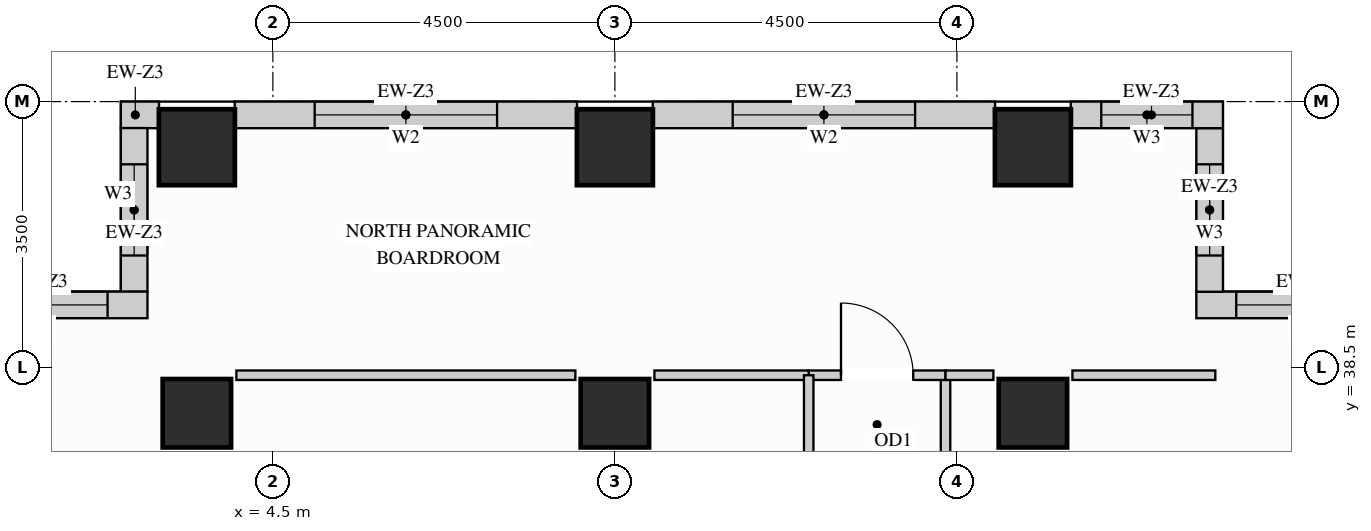
"""IFC4 building model, lengths in metres.
Left out: names, types, materials, properties, quantities, classifications, styles, units other than length and angle.
Written with IfcOpenShell. Run it as: python <this file> out.ifc"""

import sys

from ifc_helpers import new_model, si_unit, direction, frame, frame_2d, origin, origin_2d, place, context, subcontext, project, spatial, rectangle, extrude, source, transform, mapped, element, fill, save


model = new_model("IFC4")
c1 = context("Model", 3, precision=1e-05, world=origin(), true_north=direction((0.0, 1.0)))
c2 = subcontext(c1, "Body", "Model", "MODEL_VIEW")
j1 = project(units=[si_unit("LENGTHUNIT", "METRE"), si_unit("PLANEANGLEUNIT", "RADIAN")], contexts=[c1])
p1 = place(None, origin())
s1 = spatial("IfcSite", under=j1, at=p1, CompositionType="ELEMENT")
p2 = place(p1, origin())
s2 = spatial("IfcBuilding", under=s1, at=p2, CompositionType="ELEMENT")
p3 = place(p2, frame((0.0, 0.0, 197.1)))
s3 = spatial("IfcBuildingStorey", under=s2, at=p3, CompositionType="ELEMENT", Elevation=197.1)
m1 = source(origin(), c2, "Body", "SweptSolid", [
    extrude(rectangle(XDim=0.9, YDim=0.9, at=origin_2d()), origin(), (0.0, 0.0, 1.0), 3.4),
])
for number, where, z_axis, x_axis in (
    (1, (14.5, 37.9, 0.0), (0.0, 0.0, 1.0), (1.0, 0.0, 0.0)),
    (2, (3.5, 37.9, 0.0), (0.0, 0.0, 1.0), (1.0, 0.0, 0.0)),
    (3, (9.0, 37.9, 0.0), (0.0, 0.0, 1.0), (1.0, 0.0, 0.0)),
):
    element("IfcColumn", number, at=place(p3, frame(where, z_axis=z_axis, x_axis=x_axis)), inside=s3, PredefinedType="COLUMN", context=c2, shape_type="MappedRepresentation", body=[
        mapped(m1, transform((0.0, 0.0, 0.0), x_axis=(1.0, 0.0, 0.0), y_axis=(0.0, 1.0, 0.0), z_axis=(0.0, 0.0, 1.0))),
    ])
m2 = source(origin(), c2, "Body", "SweptSolid", [
    extrude(rectangle(XDim=1.0, YDim=1.0, at=origin_2d()), origin(), (0.0, 0.0, 1.0), 3.4),
])
for number, where, z_axis, x_axis in (
    (4, (14.5, 41.4, 0.0), (0.0, 0.0, 1.0), (1.0, 0.0, 0.0)),
    (5, (3.5, 41.4, 0.0), (0.0, 0.0, 1.0), (1.0, 0.0, 0.0)),
    (6, (9.0, 41.4, 0.0), (0.0, 0.0, 1.0), (1.0, 0.0, 0.0)),
):
    element("IfcColumn", number, at=place(p3, frame(where, z_axis=z_axis, x_axis=x_axis)), inside=s3, PredefinedType="COLUMN", context=c2, shape_type="MappedRepresentation", body=[
        mapped(m2, transform((0.0, 0.0, 0.0), x_axis=(1.0, 0.0, 0.0), y_axis=(0.0, 1.0, 0.0), z_axis=(0.0, 0.0, 1.0))),
    ])
p4 = place(p3, frame((19.5, 39.325, 0.0), z_axis=(0.0, 0.0, 1.0), x_axis=(-1.0, 0.0, 0.0)))
e7 = element("IfcWall", 7, at=p4, inside=s3, PredefinedType="SOLIDWALL", context=c2, shape_type="SweptSolid", body=[
    extrude(rectangle(XDim=2.85, YDim=0.35, at=frame_2d((1.425, 0.0))), origin(), (0.0, 0.0, 1.0), 3.385),
])
p5 = place(p4, frame((0.525, 0.0, 0.78)))
e8 = element("IfcOpeningElement", 8, at=p5, cuts=e7, PredefinedType="OPENING", context=c2, shape_type="SweptSolid", body=[
    extrude(rectangle(XDim=1.8, YDim=2.1, at=frame_2d((0.9, 1.05))), frame((0.0, 0.185, 0.0), z_axis=(0.0, -1.0, 0.0), x_axis=(1.0, 0.0, 0.0)), (0.0, 0.0, 1.0), 0.37),
])
p6 = place(p3, frame((16.825, 39.498, 0.0), z_axis=(0.0, 0.0, 1.0), x_axis=(0.0, 1.0, 0.0)))
e9 = element("IfcWall", 9, at=p6, inside=s3, PredefinedType="SOLIDWALL", context=c2, shape_type="SweptSolid", body=[
    extrude(rectangle(XDim=2.154, YDim=0.35, at=frame_2d((1.077, 0.0))), origin(), (0.0, 0.0, 1.0), 3.385),
])
p7 = place(p6, frame((0.477, 0.0, 0.78)))
e10 = element("IfcOpeningElement", 10, at=p7, cuts=e9, PredefinedType="OPENING", context=c2, shape_type="SweptSolid", body=[
    extrude(rectangle(XDim=1.2, YDim=2.1, at=frame_2d((0.6, 1.05))), frame((0.0, 0.185, 0.0), z_axis=(0.0, -1.0, 0.0), x_axis=(1.0, 0.0, 0.0)), (0.0, 0.0, 1.0), 0.37),
])
p8 = place(p3, frame((17.0, 41.825, 0.0), z_axis=(0.0, 0.0, 1.0), x_axis=(-1.0, 0.0, 0.0)))
e11 = element("IfcWall", 11, at=p8, inside=s3, PredefinedType="SOLIDWALL", context=c2, shape_type="SweptSolid", body=[
    extrude(rectangle(XDim=2.002, YDim=0.35, at=frame_2d((1.001, 0.0))), origin(), (0.0, 0.0, 1.0), 3.385),
])
p9 = place(p8, frame((0.401, 0.0, 0.78)))
e12 = element("IfcOpeningElement", 12, at=p9, cuts=e11, PredefinedType="OPENING", context=c2, shape_type="SweptSolid", body=[
    extrude(rectangle(XDim=1.2, YDim=2.1, at=frame_2d((0.6, 1.05))), frame((0.0, 0.185, 0.0), z_axis=(0.0, -1.0, 0.0), x_axis=(1.0, 0.0, 0.0)), (0.0, 0.0, 1.0), 0.37),
])
p10 = place(p3, frame((14.002, 41.825, 0.0), z_axis=(0.0, 0.0, 1.0), x_axis=(-1.0, 0.0, 0.0)))
e13 = element("IfcWall", 13, at=p10, inside=s3, PredefinedType="SOLIDWALL", context=c2, shape_type="SweptSolid", body=[
    extrude(rectangle(XDim=4.504, YDim=0.35, at=frame_2d((2.252, 0.0))), origin(), (0.0, 0.0, 1.0), 2.612),
])
p11 = place(p10, frame((1.052, 0.0, 0.78)))
e14 = element("IfcOpeningElement", 14, at=p11, cuts=e13, PredefinedType="OPENING", context=c2, shape_type="SweptSolid", body=[
    extrude(rectangle(XDim=2.4, YDim=1.652, at=frame_2d((1.2, 0.826))), frame((0.0, 0.185, 0.0), z_axis=(0.0, -1.0, 0.0), x_axis=(1.0, 0.0, 0.0)), (0.0, 0.0, 1.0), 0.37),
])
p12 = place(p3, frame((8.502, 41.825, 0.0), z_axis=(0.0, 0.0, 1.0), x_axis=(-1.0, 0.0, 0.0)))
e15 = element("IfcWall", 15, at=p12, inside=s3, PredefinedType="SOLIDWALL", context=c2, shape_type="SweptSolid", body=[
    extrude(rectangle(XDim=4.504, YDim=0.35, at=frame_2d((2.252, 0.0))), origin(), (0.0, 0.0, 1.0), 2.612),
])
p13 = place(p12, frame((1.052, 0.0, 0.78)))
e16 = element("IfcOpeningElement", 16, at=p13, cuts=e15, PredefinedType="OPENING", context=c2, shape_type="SweptSolid", body=[
    extrude(rectangle(XDim=2.4, YDim=1.652, at=frame_2d((1.2, 0.826))), frame((0.0, 0.185, 0.0), z_axis=(0.0, -1.0, 0.0), x_axis=(1.0, 0.0, 0.0)), (0.0, 0.0, 1.0), 0.37),
])
m3 = source(origin(), c2, "Body", "SweptSolid", [
    extrude(rectangle(XDim=0.502, YDim=0.35, at=frame_2d((0.251, 0.0))), origin(), (0.0, 0.0, 1.0), 3.385),
])
p14 = place(p3, frame((3.002, 41.825, 0.0), z_axis=(0.0, 0.0, 1.0), x_axis=(-1.0, 0.0, 0.0)))
e17 = element("IfcWall", 17, at=p14, inside=s3, PredefinedType="SOLIDWALL", context=c2, shape_type="MappedRepresentation", body=[
    mapped(m3, transform((0.0, 0.0, 0.0), x_axis=(1.0, 0.0, 0.0), y_axis=(0.0, 1.0, 0.0), z_axis=(0.0, 0.0, 1.0))),
])
p15 = place(p3, frame((2.675, 41.652, 0.0), z_axis=(0.0, 0.0, 1.0), x_axis=(0.0, -1.0, 0.0)))
e18 = element("IfcWall", 18, at=p15, inside=s3, PredefinedType="SOLIDWALL", context=c2, shape_type="SweptSolid", body=[
    extrude(rectangle(XDim=2.154, YDim=0.35, at=frame_2d((1.077, 0.0))), origin(), (0.0, 0.0, 1.0), 3.385),
])
p16 = place(p15, frame((0.477, 0.0, 0.78)))
e19 = element("IfcOpeningElement", 19, at=p16, cuts=e18, PredefinedType="OPENING", context=c2, shape_type="SweptSolid", body=[
    extrude(rectangle(XDim=1.2, YDim=2.1, at=frame_2d((0.6, 1.05))), frame((0.0, 0.185, 0.0), z_axis=(0.0, -1.0, 0.0), x_axis=(1.0, 0.0, 0.0)), (0.0, 0.0, 1.0), 0.37),
])
p17 = place(p3, frame((2.85, 39.325, 0.0), z_axis=(0.0, 0.0, 1.0), x_axis=(-1.0, 0.0, 0.0)))
e20 = element("IfcWall", 20, at=p17, inside=s3, PredefinedType="SOLIDWALL", context=c2, shape_type="SweptSolid", body=[
    extrude(rectangle(XDim=2.85, YDim=0.35, at=frame_2d((1.425, 0.0))), origin(), (0.0, 0.0, 1.0), 3.385),
])
p18 = place(p17, frame((0.525, 0.0, 0.78)))
e21 = element("IfcOpeningElement", 21, at=p18, cuts=e20, PredefinedType="OPENING", context=c2, shape_type="SweptSolid", body=[
    extrude(rectangle(XDim=1.8, YDim=2.1, at=frame_2d((0.9, 1.05))), frame((0.0, 0.185, 0.0), z_axis=(0.0, -1.0, 0.0), x_axis=(1.0, 0.0, 0.0)), (0.0, 0.0, 1.0), 0.37),
])
p19 = place(p3, frame((13.35, 32.35, 0.0), z_axis=(0.0, 0.0, 1.0), x_axis=(0.0, 1.0, 0.0)))
e22 = element("IfcWall", 22, at=p19, inside=s3, PredefinedType="PARTITIONING", context=c2, shape_type="SweptSolid", body=[
    extrude(rectangle(XDim=6.05, YDim=0.125, at=frame_2d((3.025, 0.0))), origin(), (0.0, 0.0, 1.0), 3.385),
])
p20 = place(p19, frame((2.55, 0.0, 0.0)))
e23 = element("IfcOpeningElement", 23, at=p20, cuts=e22, PredefinedType="OPENING", context=c2, shape_type="SweptSolid", body=[
    extrude(rectangle(XDim=0.95, YDim=2.15, at=frame_2d((0.475, 1.075))), frame((0.0, 0.073, 0.0), z_axis=(0.0, -1.0, 0.0), x_axis=(1.0, 0.0, 0.0)), (0.0, 0.0, 1.0), 0.145),
])
p21 = place(p3, frame((11.55, 38.4, 0.0), z_axis=(0.0, 0.0, 1.0), x_axis=(1.0, 0.0, 0.0)))
e24 = element("IfcWall", 24, at=p21, inside=s3, PredefinedType="PARTITIONING", context=c2, shape_type="SweptSolid", body=[
    extrude(rectangle(XDim=1.8, YDim=0.125, at=frame_2d((0.9, 0.0))), origin(), (0.0, 0.0, 1.0), 3.385),
])
p22 = place(p21, frame((0.425, 0.0, 0.0)))
e25 = element("IfcOpeningElement", 25, at=p22, cuts=e24, PredefinedType="OPENING", context=c2, shape_type="SweptSolid", body=[
    extrude(rectangle(XDim=0.95, YDim=2.15, at=frame_2d((0.475, 1.075))), frame((0.0, 0.073, 0.0), z_axis=(0.0, -1.0, 0.0), x_axis=(1.0, 0.0, 0.0)), (0.0, 0.0, 1.0), 0.145),
])
m4 = source(origin(), c2, "Body", "SweptSolid", [
    extrude(rectangle(XDim=0.63, YDim=0.125, at=frame_2d((0.315, 0.0))), origin(), (0.0, 0.0, 1.0), 3.385),
])
p23 = place(p3, frame((13.35, 38.4, 0.0), z_axis=(0.0, 0.0, 1.0), x_axis=(1.0, 0.0, 0.0)))
e26 = element("IfcWall", 26, at=p23, inside=s3, PredefinedType="PARTITIONING", context=c2, shape_type="MappedRepresentation", body=[
    mapped(m4, transform((0.0, 0.0, 0.0), x_axis=(1.0, 0.0, 0.0), y_axis=(0.0, 1.0, 0.0), z_axis=(0.0, 0.0, 1.0))),
])
m5 = source(origin(), c2, "Body", "SweptSolid", [
    extrude(rectangle(XDim=1.88, YDim=0.125, at=frame_2d((0.94, 0.0))), origin(), (0.0, 0.0, 1.0), 3.385),
])
p24 = place(p3, frame((15.02, 38.4, 0.0), z_axis=(0.0, 0.0, 1.0), x_axis=(1.0, 0.0, 0.0)))
e27 = element("IfcWall", 27, at=p24, inside=s3, PredefinedType="PARTITIONING", context=c2, shape_type="MappedRepresentation", body=[
    mapped(m5, transform((0.0, 0.0, 0.0), x_axis=(1.0, 0.0, 0.0), y_axis=(0.0, 1.0, 0.0), z_axis=(0.0, 0.0, 1.0))),
])
m6 = source(origin(), c2, "Body", "SweptSolid", [
    extrude(rectangle(XDim=4.46, YDim=0.125, at=frame_2d((2.23, 0.0))), origin(), (0.0, 0.0, 1.0), 3.385),
])
p25 = place(p3, frame((4.02, 38.4, 0.0), z_axis=(0.0, 0.0, 1.0), x_axis=(1.0, 0.0, 0.0)))
e28 = element("IfcWall", 28, at=p25, inside=s3, PredefinedType="PARTITIONING", context=c2, shape_type="MappedRepresentation", body=[
    mapped(m6, transform((0.0, 0.0, 0.0), x_axis=(1.0, 0.0, 0.0), y_axis=(0.0, 1.0, 0.0), z_axis=(0.0, 0.0, 1.0))),
])
m7 = source(origin(), c2, "Body", "SweptSolid", [
    extrude(rectangle(XDim=2.03, YDim=0.125, at=frame_2d((1.015, 0.0))), origin(), (0.0, 0.0, 1.0), 3.385),
])
p26 = place(p3, frame((9.52, 38.4, 0.0), z_axis=(0.0, 0.0, 1.0), x_axis=(1.0, 0.0, 0.0)))
e29 = element("IfcWall", 29, at=p26, inside=s3, PredefinedType="PARTITIONING", context=c2, shape_type="MappedRepresentation", body=[
    mapped(m7, transform((0.0, 0.0, 0.0), x_axis=(1.0, 0.0, 0.0), y_axis=(0.0, 1.0, 0.0), z_axis=(0.0, 0.0, 1.0))),
])
p27 = place(p3, frame((11.55, 35.254, 0.0), z_axis=(0.0, 0.0, 1.0), x_axis=(0.0, 1.0, 0.0)))
e30 = element("IfcWall", 30, at=p27, inside=s3, PredefinedType="PARTITIONING", context=c2, shape_type="SweptSolid", body=[
    extrude(rectangle(XDim=3.146, YDim=0.125, at=frame_2d((1.573, 0.0))), origin(), (0.0, 0.0, 1.0), 3.385),
])
p28 = place(p27, frame((1.098, 0.0, 0.0)))
e31 = element("IfcOpeningElement", 31, at=p28, cuts=e30, PredefinedType="OPENING", context=c2, shape_type="SweptSolid", body=[
    extrude(rectangle(XDim=0.95, YDim=2.15, at=frame_2d((0.475, 1.075))), frame((0.0, 0.073, 0.0), z_axis=(0.0, -1.0, 0.0), x_axis=(1.0, 0.0, 0.0)), (0.0, 0.0, 1.0), 0.145),
])
m8 = source(origin(), c2, "Body", "SweptSolid", [
    extrude(rectangle(XDim=0.95, YDim=2.15, at=frame_2d((0.475, 1.075))), frame((0.0, 0.025, 0.0), z_axis=(0.0, -1.0, 0.0), x_axis=(1.0, 0.0, 0.0)), (0.0, 0.0, 1.0), 0.05),
])
p29 = place(p22, origin())
e32 = element("IfcDoor", 32, at=p29, inside=s3, OperationType="SINGLE_SWING_LEFT", PredefinedType="DOOR", context=c2, shape_type="MappedRepresentation", body=[
    mapped(m8, transform((0.0, 0.0, 0.0), x_axis=(1.0, 0.0, 0.0), y_axis=(0.0, 1.0, 0.0), z_axis=(0.0, 0.0, 1.0))),
])
fill(e25, e32)
m9 = source(origin(), c2, "Body", "SweptSolid", [
    extrude(rectangle(XDim=1.8, YDim=2.1, at=frame_2d((0.9, 1.05))), frame((0.0, 0.03, 0.0), z_axis=(0.0, -1.0, 0.0), x_axis=(1.0, 0.0, 0.0)), (0.0, 0.0, 1.0), 0.06),
])
p30 = place(p5, origin())
e33 = element("IfcWindow", 33, at=p30, inside=s3, PartitioningType="SINGLE_PANEL", PredefinedType="WINDOW", context=c2, shape_type="MappedRepresentation", body=[
    mapped(m9, transform((0.0, 0.0, 0.0), x_axis=(1.0, 0.0, 0.0), y_axis=(0.0, 1.0, 0.0), z_axis=(0.0, 0.0, 1.0))),
])
fill(e8, e33)
p31 = place(p18, origin())
e34 = element("IfcWindow", 34, at=p31, inside=s3, PartitioningType="SINGLE_PANEL", PredefinedType="WINDOW", context=c2, shape_type="MappedRepresentation", body=[
    mapped(m9, transform((0.0, 0.0, 0.0), x_axis=(1.0, 0.0, 0.0), y_axis=(0.0, 1.0, 0.0), z_axis=(0.0, 0.0, 1.0))),
])
fill(e21, e34)
m10 = source(origin(), c2, "Body", "SweptSolid", [
    extrude(rectangle(XDim=2.4, YDim=1.652, at=frame_2d((1.2, 0.826))), frame((0.0, 0.03, 0.0), z_axis=(0.0, -1.0, 0.0), x_axis=(1.0, 0.0, 0.0)), (0.0, 0.0, 1.0), 0.06),
])
p32 = place(p11, origin())
e35 = element("IfcWindow", 35, at=p32, inside=s3, PartitioningType="SINGLE_PANEL", PredefinedType="WINDOW", context=c2, shape_type="MappedRepresentation", body=[
    mapped(m10, transform((0.0, 0.0, 0.0), x_axis=(1.0, 0.0, 0.0), y_axis=(0.0, 1.0, 0.0), z_axis=(0.0, 0.0, 1.0))),
])
fill(e14, e35)
p33 = place(p13, origin())
e36 = element("IfcWindow", 36, at=p33, inside=s3, PartitioningType="SINGLE_PANEL", PredefinedType="WINDOW", context=c2, shape_type="MappedRepresentation", body=[
    mapped(m10, transform((0.0, 0.0, 0.0), x_axis=(1.0, 0.0, 0.0), y_axis=(0.0, 1.0, 0.0), z_axis=(0.0, 0.0, 1.0))),
])
fill(e16, e36)
m11 = source(origin(), c2, "Body", "SweptSolid", [
    extrude(rectangle(XDim=1.2, YDim=2.1, at=frame_2d((0.6, 1.05))), frame((0.0, 0.03, 0.0), z_axis=(0.0, -1.0, 0.0), x_axis=(1.0, 0.0, 0.0)), (0.0, 0.0, 1.0), 0.06),
])
p34 = place(p7, origin())
e37 = element("IfcWindow", 37, at=p34, inside=s3, PartitioningType="SINGLE_PANEL", PredefinedType="WINDOW", context=c2, shape_type="MappedRepresentation", body=[
    mapped(m11, transform((0.0, 0.0, 0.0), x_axis=(1.0, 0.0, 0.0), y_axis=(0.0, 1.0, 0.0), z_axis=(0.0, 0.0, 1.0))),
])
fill(e10, e37)
p35 = place(p9, origin())
e38 = element("IfcWindow", 38, at=p35, inside=s3, PartitioningType="SINGLE_PANEL", PredefinedType="WINDOW", context=c2, shape_type="MappedRepresentation", body=[
    mapped(m11, transform((0.0, 0.0, 0.0), x_axis=(1.0, 0.0, 0.0), y_axis=(0.0, 1.0, 0.0), z_axis=(0.0, 0.0, 1.0))),
])
fill(e12, e38)
p36 = place(p16, origin())
e39 = element("IfcWindow", 39, at=p36, inside=s3, PartitioningType="SINGLE_PANEL", PredefinedType="WINDOW", context=c2, shape_type="MappedRepresentation", body=[
    mapped(m11, transform((0.0, 0.0, 0.0), x_axis=(1.0, 0.0, 0.0), y_axis=(0.0, 1.0, 0.0), z_axis=(0.0, 0.0, 1.0))),
])
fill(e19, e39)
save(model, sys.argv[1])
